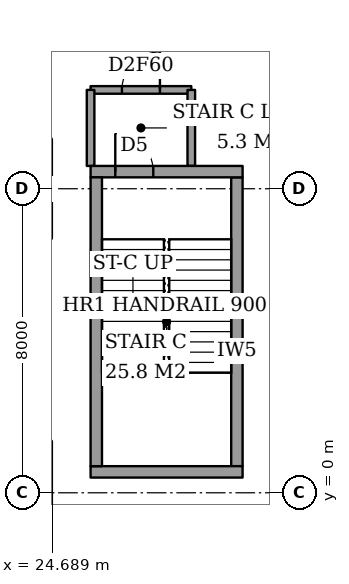
"""IFC4 building model, lengths in metres.
Left out: names, types, materials, properties, quantities, classifications, styles, units other than length and angle.
Written with IfcOpenShell. Run it as: python <this file> out.ifc"""

import sys

from ifc_helpers import new_model, si_unit, direction, frame, frame_2d, origin, place, context, subcontext, project, spatial, rectangle, extrude, element, fill, save


model = new_model("IFC4")
c1 = context("Model", 3, precision=1e-05, world=origin(), true_north=direction((0.0, 1.0)))
c2 = subcontext(c1, "Body", "Model", "MODEL_VIEW")
j1 = project(units=[si_unit("LENGTHUNIT", "METRE"), si_unit("PLANEANGLEUNIT", "RADIAN")], contexts=[c1])
p1 = place(None, origin())
s1 = spatial("IfcSite", under=j1, at=p1, CompositionType="ELEMENT")
p2 = place(p1, origin())
s2 = spatial("IfcBuilding", under=s1, at=p2, CompositionType="ELEMENT")
p3 = place(p2, frame((0.0, 0.0, -5.0)))
s3 = spatial("IfcBuildingStorey", under=s2, at=p3, CompositionType="ELEMENT", Elevation=-5.0)
p4 = place(p3, frame((25.7, 10.6, 0.0), z_axis=(0.0, 0.0, 1.0), x_axis=(1.0, 0.0, 0.0)))
e1 = element("IfcWall", 1, at=p4, inside=s3, PredefinedType="PARTITIONING", context=c2, shape_type="SweptSolid", body=[
    extrude(rectangle(XDim=2.65, YDim=0.2, at=frame_2d((1.325, 0.0))), origin(), (0.0, 0.0, 1.0), 4.7),
])
p5 = place(p4, frame((0.825, 0.0, 0.0)))
e2 = element("IfcOpeningElement", 2, at=p5, cuts=e1, PredefinedType="OPENING", context=c2, shape_type="SweptSolid", body=[
    extrude(rectangle(XDim=1.0, YDim=2.1, at=frame_2d((0.5, 1.05))), frame((0.0, 0.11, 0.0), z_axis=(0.0, -1.0, 0.0), x_axis=(1.0, 0.0, 0.0)), (0.0, 0.0, 1.0), 0.22),
])
for number, where, z_axis, x_axis in (
    (3, (25.7, 8.6, 0.0), (0.0, 0.0, 1.0), (0.0, 1.0, 0.0)),
    (4, (28.35, 8.6, 0.0), (0.0, 0.0, 1.0), (0.0, 1.0, 0.0)),
):
    element("IfcWall", number, at=place(p3, frame(where, z_axis=z_axis, x_axis=x_axis)), inside=s3, PredefinedType="PARTITIONING", context=c2, shape_type="SweptSolid", body=[
        extrude(rectangle(XDim=2.0, YDim=0.2, at=frame_2d((1.0, 0.0))), origin(), (0.0, 0.0, 1.0), 4.7),
    ])
p6 = place(p3, frame((25.7, 0.55, 0.0), z_axis=(0.0, 0.0, 1.0), x_axis=(1.0, 0.0, 0.0)))
e5 = element("IfcWall", 5, at=p6, inside=s3, PredefinedType="PARTITIONING", context=c2, shape_type="SweptSolid", body=[
    extrude(rectangle(XDim=4.0, YDim=0.3, at=frame_2d((2.0, 0.0))), origin(), (0.0, 0.0, 1.0), 5.0),
])
p7 = place(p3, frame((25.7, 8.45, 0.0), z_axis=(0.0, 0.0, 1.0), x_axis=(1.0, 0.0, 0.0)))
e6 = element("IfcWall", 6, at=p7, inside=s3, PredefinedType="PARTITIONING", context=c2, shape_type="SweptSolid", body=[
    extrude(rectangle(XDim=4.0, YDim=0.3, at=frame_2d((2.0, 0.0))), origin(), (0.0, 0.0, 1.0), 5.0),
])
p8 = place(p7, frame((0.65, 0.0, 0.0)))
e7 = element("IfcOpeningElement", 7, at=p8, cuts=e6, PredefinedType="OPENING", context=c2, shape_type="SweptSolid", body=[
    extrude(rectangle(XDim=1.0, YDim=2.1, at=frame_2d((0.5, 1.05))), frame((0.0, 0.16, 0.0), z_axis=(0.0, -1.0, 0.0), x_axis=(1.0, 0.0, 0.0)), (0.0, 0.0, 1.0), 0.32),
])
for number, where, z_axis, x_axis in (
    (8, (25.85, 0.7, 0.0), (0.0, 0.0, 1.0), (0.0, 1.0, 0.0)),
    (9, (29.55, 0.7, 0.0), (0.0, 0.0, 1.0), (0.0, 1.0, 0.0)),
):
    element("IfcWall", number, at=place(p3, frame(where, z_axis=z_axis, x_axis=x_axis)), inside=s3, PredefinedType="PARTITIONING", context=c2, shape_type="SweptSolid", body=[
        extrude(rectangle(XDim=7.6, YDim=0.3, at=frame_2d((3.8, 0.0))), origin(), (0.0, 0.0, 1.0), 5.0),
    ])
p9 = place(p5, origin())
e10 = element("IfcDoor", 10, at=p9, inside=s3, OperationType="SINGLE_SWING_LEFT", PredefinedType="DOOR", context=c2, shape_type="SweptSolid", body=[
    extrude(rectangle(XDim=1.0, YDim=2.1, at=frame_2d((0.5, 1.05))), frame((0.0, 0.025, 0.0), z_axis=(0.0, -1.0, 0.0), x_axis=(1.0, 0.0, 0.0)), (0.0, 0.0, 1.0), 0.05),
])
fill(e2, e10)
p10 = place(p8, origin())
e11 = element("IfcDoor", 11, at=p10, inside=s3, OperationType="SINGLE_SWING_RIGHT", PredefinedType="DOOR", context=c2, shape_type="SweptSolid", body=[
    extrude(rectangle(XDim=1.0, YDim=2.1, at=frame_2d((0.5, 1.05))), frame((0.0, 0.025, 0.0), z_axis=(0.0, -1.0, 0.0), x_axis=(1.0, 0.0, 0.0)), (0.0, 0.0, 1.0), 0.05),
])
fill(e7, e11)
save(model, sys.argv[1])
